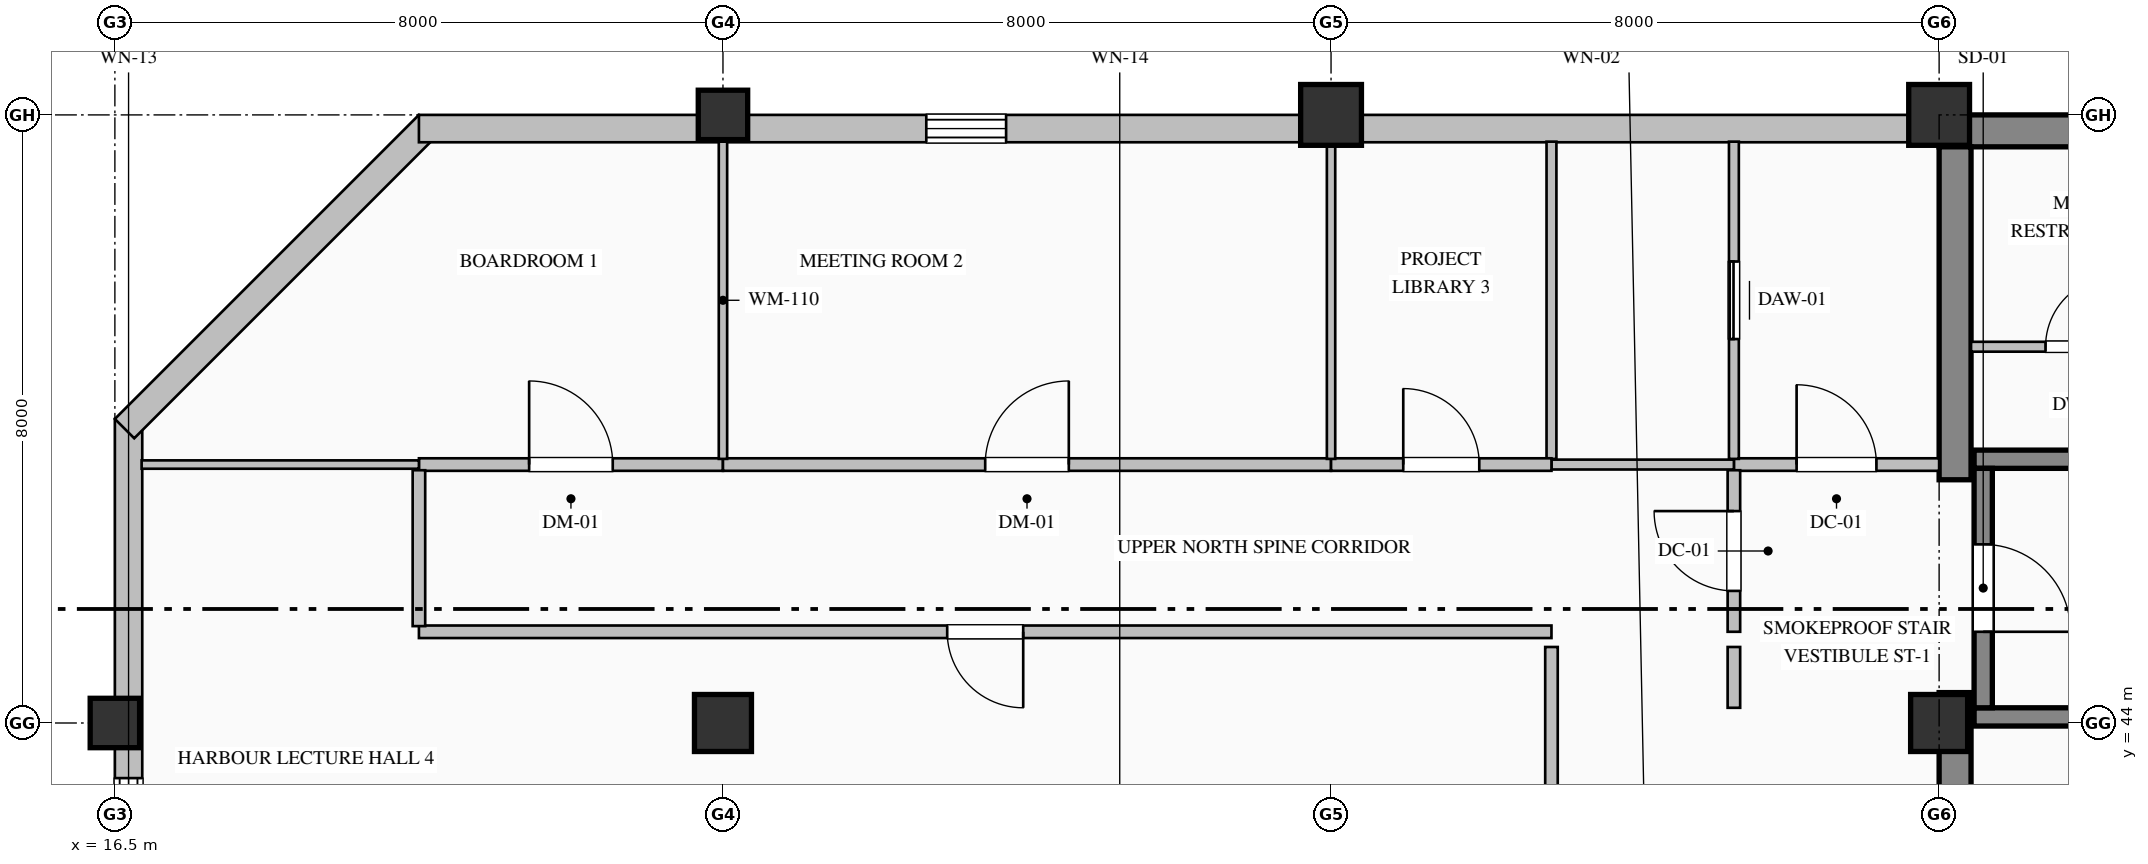
"""IFC4 building model, lengths in metres.
Left out: names, types, materials, properties, quantities, classifications, styles, units other than length and angle.
Written with IfcOpenShell. Run it as: python <this file> out.ifc"""

import sys

from ifc_helpers import new_model, si_unit, direction, frame, frame_2d, origin, origin_2d, place, context, subcontext, project, spatial, rectangle, hollow_rectangle, extrude, element, fill, save


model = new_model("IFC4")
c1 = context("Model", 3, precision=1e-05, world=origin(), true_north=direction((0.0, 1.0)))
c2 = subcontext(c1, "Body", "Model", "MODEL_VIEW")
j1 = project(units=[si_unit("LENGTHUNIT", "METRE"), si_unit("PLANEANGLEUNIT", "RADIAN")], contexts=[c1])
p1 = place(None, origin())
s1 = spatial("IfcSite", under=j1, at=p1, CompositionType="ELEMENT")
p2 = place(p1, origin())
s2 = spatial("IfcBuilding", under=s1, at=p2, CompositionType="ELEMENT")
p3 = place(p2, frame((0.0, 0.0, 303.2)))
s3 = spatial("IfcBuildingStorey", under=s2, at=p3, CompositionType="ELEMENT", Elevation=303.2)
p4 = place(p3, frame((40.5, 51.79, 0.0), z_axis=(0.0, 0.0, 1.0), x_axis=(1.0, 0.0, 0.0)))
e1 = element("IfcWall", 1, at=p4, inside=s3, PredefinedType="SHEAR", context=c2, shape_type="SweptSolid", body=[
    extrude(rectangle(XDim=23.5, YDim=0.42, at=frame_2d((11.75, 0.0))), origin(), (0.0, 0.0, 1.0), 3.785),
])
p5 = place(p3, frame((40.71, 36.42, 0.0), z_axis=(0.0, 0.0, 1.0), x_axis=(0.0, 1.0, 0.0)))
e2 = element("IfcWall", 2, at=p5, inside=s3, PredefinedType="SHEAR", context=c2, shape_type="SweptSolid", body=[
    extrude(rectangle(XDim=7.98, YDim=0.42, at=frame_2d((3.99, 0.0))), origin(), (0.0, 0.0, 1.0), 3.785),
])
p6 = place(p3, frame((40.71, 47.2, 0.0), z_axis=(0.0, 0.0, 1.0), x_axis=(0.0, 1.0, 0.0)))
e3 = element("IfcWall", 3, at=p6, inside=s3, PredefinedType="SHEAR", context=c2, shape_type="SweptSolid", body=[
    extrude(rectangle(XDim=4.38, YDim=0.42, at=frame_2d((2.19, 0.0))), origin(), (0.0, 0.0, 1.0), 3.785),
])
p7 = place(p3, frame((16.5, 44.0, 0.0), z_axis=(0.0, 0.0, 1.0), x_axis=(1.0, 0.0, 0.0)))
e4 = element("IfcColumn", 4, at=p7, inside=s3, PredefinedType="COLUMN", context=c2, shape_type="SweptSolid", body=[
    extrude(hollow_rectangle(XDim=0.65, YDim=0.65, WallThickness=0.028, at=origin_2d()), origin(), (0.0, 0.0, 1.0), 4.0),
])
p8 = place(p3, frame((24.5, 44.0, 0.0), z_axis=(0.0, 0.0, 1.0), x_axis=(1.0, 0.0, 0.0)))
e5 = element("IfcColumn", 5, at=p8, inside=s3, PredefinedType="COLUMN", context=c2, shape_type="SweptSolid", body=[
    extrude(rectangle(XDim=0.75, YDim=0.75, at=origin_2d()), origin(), (0.0, 0.0, 1.0), 4.0),
])
p9 = place(p3, frame((24.5, 52.0, 0.0), z_axis=(0.0, 0.0, 1.0), x_axis=(1.0, 0.0, 0.0)))
e6 = element("IfcColumn", 6, at=p9, inside=s3, PredefinedType="COLUMN", context=c2, shape_type="SweptSolid", body=[
    extrude(hollow_rectangle(XDim=0.65, YDim=0.65, WallThickness=0.028, at=origin_2d()), origin(), (0.0, 0.0, 1.0), 4.0),
])
p10 = place(p3, frame((32.5, 52.0, 0.0), z_axis=(0.0, 0.0, 1.0), x_axis=(1.0, 0.0, 0.0)))
e7 = element("IfcColumn", 7, at=p10, inside=s3, PredefinedType="COLUMN", context=c2, shape_type="SweptSolid", body=[
    extrude(hollow_rectangle(XDim=0.8, YDim=0.8, WallThickness=0.032, at=origin_2d()), origin(), (0.0, 0.0, 1.0), 4.0),
])
p11 = place(p3, frame((40.5, 44.0, 0.0), z_axis=(0.0, 0.0, 1.0), x_axis=(1.0, 0.0, 0.0)))
e8 = element("IfcColumn", 8, at=p11, inside=s3, PredefinedType="COLUMN", context=c2, shape_type="SweptSolid", body=[
    extrude(rectangle(XDim=0.75, YDim=0.75, at=origin_2d()), origin(), (0.0, 0.0, 1.0), 4.0),
])
p12 = place(p3, frame((40.5, 52.0, 0.0), z_axis=(0.0, 0.0, 1.0), x_axis=(1.0, 0.0, 0.0)))
e9 = element("IfcColumn", 9, at=p12, inside=s3, PredefinedType="COLUMN", context=c2, shape_type="SweptSolid", body=[
    extrude(hollow_rectangle(XDim=0.8, YDim=0.8, WallThickness=0.032, at=origin_2d()), origin(), (0.0, 0.0, 1.0), 4.0),
])
p13 = place(p3, frame((16.68, 32.0, 0.0), z_axis=(0.0, 0.0, 1.0), x_axis=(0.0, 1.0, 0.0)))
e10 = element("IfcWall", 10, at=p13, inside=s3, PredefinedType="SOLIDWALL", context=c2, shape_type="SweptSolid", body=[
    extrude(rectangle(XDim=16.0, YDim=0.36, at=frame_2d((8.0, 0.0))), origin(), (0.0, 0.0, 1.0), 3.335),
])
p14 = place(p13, frame((6.525, 0.0, 0.9)))
e11 = element("IfcOpeningElement", 11, at=p14, cuts=e10, PredefinedType="OPENING", context=c2, shape_type="SweptSolid", body=[
    extrude(rectangle(XDim=1.35, YDim=1.85, at=frame_2d((0.675, 0.925))), frame((0.0, 0.19, 0.0), z_axis=(0.0, -1.0, 0.0), x_axis=(1.0, 0.0, 0.0)), (0.0, 0.0, 1.0), 0.38),
])
p15 = place(p13, frame((10.325, 0.0, 0.9)))
e12 = element("IfcOpeningElement", 12, at=p15, cuts=e10, PredefinedType="OPENING", context=c2, shape_type="SweptSolid", body=[
    extrude(rectangle(XDim=0.95, YDim=1.85, at=frame_2d((0.475, 0.925))), frame((0.0, 0.19, 0.0), z_axis=(0.0, -1.0, 0.0), x_axis=(1.0, 0.0, 0.0)), (0.0, 0.0, 1.0), 0.38),
])
p16 = place(p3, frame((16.627, 47.873, 0.0), z_axis=(0.0, 0.0, 1.0), x_axis=(0.707106781187, 0.707106781187, 0.0)))
e13 = element("IfcWall", 13, at=p16, inside=s3, PredefinedType="SOLIDWALL", context=c2, shape_type="SweptSolid", body=[
    extrude(rectangle(XDim=5.657, YDim=0.36, at=frame_2d((2.828, 0.0))), origin(), (0.0, 0.0, 1.0), 3.785),
])
p17 = place(p3, frame((20.5, 51.82, 0.0), z_axis=(0.0, 0.0, 1.0), x_axis=(1.0, 0.0, 0.0)))
e14 = element("IfcWall", 14, at=p17, inside=s3, PredefinedType="SOLIDWALL", context=c2, shape_type="SweptSolid", body=[
    extrude(rectangle(XDim=20.02, YDim=0.36, at=frame_2d((10.01, 0.0))), origin(), (0.0, 0.0, 1.0), 3.335),
])
p18 = place(p17, frame((6.675, 0.0, 0.8)))
e15 = element("IfcOpeningElement", 15, at=p18, cuts=e14, PredefinedType="OPENING", context=c2, shape_type="SweptSolid", body=[
    extrude(rectangle(XDim=1.05, YDim=2.15, at=frame_2d((0.525, 1.075))), frame((0.0, 0.19, 0.0), z_axis=(0.0, -1.0, 0.0), x_axis=(1.0, 0.0, 0.0)), (0.0, 0.0, 1.0), 0.38),
])
for number, where, z_axis, x_axis in (
    (16, (40.96, 47.47, 0.0), (0.0, 0.0, 1.0), (1.0, 0.0, 0.0)),
    (17, (49.04, 44.08, 0.0), (0.0, 0.0, 1.0), (-1.0, 0.0, 0.0)),
):
    element("IfcWall", number, at=place(p3, frame(where, z_axis=z_axis, x_axis=x_axis)), inside=s3, PredefinedType="SOLIDWALL", context=c2, shape_type="SweptSolid", body=[
        extrude(rectangle(XDim=8.08, YDim=0.24, at=frame_2d((4.04, 0.0))), origin(), (0.0, 0.0, 1.0), 4.0),
    ])
p19 = place(p3, frame((41.08, 47.35, 0.0), z_axis=(0.0, 0.0, 1.0), x_axis=(0.0, -1.0, 0.0)))
e18 = element("IfcWall", 18, at=p19, inside=s3, PredefinedType="SOLIDWALL", context=c2, shape_type="SweptSolid", body=[
    extrude(rectangle(XDim=3.15, YDim=0.24, at=frame_2d((1.575, 0.0))), origin(), (0.0, 0.0, 1.0), 4.0),
])
p20 = place(p19, frame((1.0, 0.0, 0.0)))
e19 = element("IfcOpeningElement", 19, at=p20, cuts=e18, PredefinedType="OPENING", context=c2, shape_type="SweptSolid", body=[
    extrude(rectangle(XDim=1.15, YDim=2.2, at=frame_2d((0.575, 1.1))), frame((0.0, 0.13, 0.0), z_axis=(0.0, -1.0, 0.0), x_axis=(1.0, 0.0, 0.0)), (0.0, 0.0, 1.0), 0.26),
])
p21 = place(p3, frame((37.8, 47.4, 0.0), z_axis=(0.0, 0.0, 1.0), x_axis=(1.0, 0.0, 0.0)))
e20 = element("IfcWall", 20, at=p21, inside=s3, PredefinedType="PARTITIONING", context=c2, shape_type="SweptSolid", body=[
    extrude(rectangle(XDim=2.7, YDim=0.165, at=frame_2d((1.35, 0.0))), origin(), (0.0, 0.0, 1.0), 3.785),
])
p22 = place(p21, frame((0.825, 0.0, 0.0)))
e21 = element("IfcOpeningElement", 21, at=p22, cuts=e20, PredefinedType="OPENING", context=c2, shape_type="SweptSolid", body=[
    extrude(rectangle(XDim=1.05, YDim=2.15, at=frame_2d((0.525, 1.075))), frame((0.0, 0.093, 0.0), z_axis=(0.0, -1.0, 0.0), x_axis=(1.0, 0.0, 0.0)), (0.0, 0.0, 1.0), 0.185),
])
p23 = place(p3, frame((37.8, 45.2, 0.0), z_axis=(0.0, 0.0, 1.0), x_axis=(0.0, 1.0, 0.0)))
e22 = element("IfcWall", 22, at=p23, inside=s3, PredefinedType="PARTITIONING", context=c2, shape_type="SweptSolid", body=[
    extrude(rectangle(XDim=2.125, YDim=0.165, at=frame_2d((1.063, 0.0))), origin(), (0.0, 0.0, 1.0), 3.785),
])
p24 = place(p23, frame((0.538, 0.0, 0.0)))
e23 = element("IfcOpeningElement", 23, at=p24, cuts=e22, PredefinedType="OPENING", context=c2, shape_type="SweptSolid", body=[
    extrude(rectangle(XDim=1.05, YDim=2.15, at=frame_2d((0.525, 1.075))), frame((0.0, 0.093, 0.0), z_axis=(0.0, -1.0, 0.0), x_axis=(1.0, 0.0, 0.0)), (0.0, 0.0, 1.0), 0.185),
])
p25 = place(p3, frame((37.8, 44.2, 0.0), z_axis=(0.0, 0.0, 1.0), x_axis=(0.0, 1.0, 0.0)))
e24 = element("IfcWall", 24, at=p25, inside=s3, PredefinedType="PARTITIONING", context=c2, shape_type="SweptSolid", body=[
    extrude(rectangle(XDim=0.8, YDim=0.165, at=frame_2d((0.4, 0.0))), origin(), (0.0, 0.0, 1.0), 3.785),
])
p26 = place(p3, frame((37.8, 47.475, 0.0), z_axis=(0.0, 0.0, 1.0), x_axis=(0.0, 1.0, 0.0)))
e25 = element("IfcWall", 25, at=p26, inside=s3, PredefinedType="PARTITIONING", context=c2, shape_type="SweptSolid", body=[
    extrude(rectangle(XDim=4.173, YDim=0.13, at=frame_2d((2.087, 0.0))), origin(), (0.0, 0.0, 1.0), 3.785),
])
p27 = place(p26, frame((1.577, 0.0, 0.0)))
e26 = element("IfcOpeningElement", 26, at=p27, cuts=e25, PredefinedType="OPENING", context=c2, shape_type="SweptSolid", body=[
    extrude(rectangle(XDim=1.02, YDim=2.15, at=frame_2d((0.51, 1.075))), frame((0.0, 0.075, 0.0), z_axis=(0.0, -1.0, 0.0), x_axis=(1.0, 0.0, 0.0)), (0.0, 0.0, 1.0), 0.15),
])
p28 = place(p3, frame((37.8, 47.4, 0.0), z_axis=(0.0, 0.0, 1.0), x_axis=(-1.0, 0.0, 0.0)))
e27 = element("IfcWall", 27, at=p28, inside=s3, PredefinedType="PARTITIONING", context=c2, shape_type="SweptSolid", body=[
    extrude(rectangle(XDim=2.4, YDim=0.13, at=frame_2d((1.2, 0.0))), origin(), (0.0, 0.0, 1.0), 3.785),
])
p29 = place(p3, frame((35.4, 47.475, 0.0), z_axis=(0.0, 0.0, 1.0), x_axis=(0.0, 1.0, 0.0)))
e28 = element("IfcWall", 28, at=p29, inside=s3, PredefinedType="PARTITIONING", context=c2, shape_type="SweptSolid", body=[
    extrude(rectangle(XDim=4.173, YDim=0.13, at=frame_2d((2.087, 0.0))), origin(), (0.0, 0.0, 1.0), 3.785),
])
p30 = place(p3, frame((40.92, 48.95, 0.0), z_axis=(0.0, 0.0, 1.0), x_axis=(1.0, 0.0, 0.0)))
e29 = element("IfcWall", 29, at=p30, inside=s3, PredefinedType="PARTITIONING", context=c2, shape_type="SweptSolid", body=[
    extrude(rectangle(XDim=2.88, YDim=0.13, at=frame_2d((1.44, 0.0))), origin(), (0.0, 0.0, 1.0), 3.785),
])
p31 = place(p30, frame((0.98, 0.0, 0.0)))
e30 = element("IfcOpeningElement", 30, at=p31, cuts=e29, PredefinedType="OPENING", context=c2, shape_type="SweptSolid", body=[
    extrude(rectangle(XDim=0.92, YDim=2.15, at=frame_2d((0.46, 1.075))), frame((0.0, 0.075, 0.0), z_axis=(0.0, -1.0, 0.0), x_axis=(1.0, 0.0, 0.0)), (0.0, 0.0, 1.0), 0.15),
])
p32 = place(p3, frame((20.5, 47.4, 0.0), z_axis=(0.0, 0.0, 1.0), x_axis=(1.0, 0.0, 0.0)))
e31 = element("IfcWall", 31, at=p32, inside=s3, PredefinedType="PARTITIONING", context=c2, shape_type="SweptSolid", body=[
    extrude(rectangle(XDim=4.0, YDim=0.165, at=frame_2d((2.0, 0.0))), origin(), (0.0, 0.0, 1.0), 3.785),
])
p33 = place(p32, frame((1.45, 0.0, 0.0)))
e32 = element("IfcOpeningElement", 32, at=p33, cuts=e31, PredefinedType="OPENING", context=c2, shape_type="SweptSolid", body=[
    extrude(rectangle(XDim=1.1, YDim=2.2, at=frame_2d((0.55, 1.1))), frame((0.0, 0.093, 0.0), z_axis=(0.0, -1.0, 0.0), x_axis=(1.0, 0.0, 0.0)), (0.0, 0.0, 1.0), 0.185),
])
p34 = place(p3, frame((24.5, 47.4, 0.0), z_axis=(0.0, 0.0, 1.0), x_axis=(1.0, 0.0, 0.0)))
e33 = element("IfcWall", 33, at=p34, inside=s3, PredefinedType="PARTITIONING", context=c2, shape_type="SweptSolid", body=[
    extrude(rectangle(XDim=8.0, YDim=0.165, at=frame_2d((4.0, 0.0))), origin(), (0.0, 0.0, 1.0), 3.785),
])
p35 = place(p34, frame((3.45, 0.0, 0.0)))
e34 = element("IfcOpeningElement", 34, at=p35, cuts=e33, PredefinedType="OPENING", context=c2, shape_type="SweptSolid", body=[
    extrude(rectangle(XDim=1.1, YDim=2.2, at=frame_2d((0.55, 1.1))), frame((0.0, 0.093, 0.0), z_axis=(0.0, -1.0, 0.0), x_axis=(1.0, 0.0, 0.0)), (0.0, 0.0, 1.0), 0.185),
])
p36 = place(p3, frame((32.5, 47.4, 0.0), z_axis=(0.0, 0.0, 1.0), x_axis=(1.0, 0.0, 0.0)))
e35 = element("IfcWall", 35, at=p36, inside=s3, PredefinedType="PARTITIONING", context=c2, shape_type="SweptSolid", body=[
    extrude(rectangle(XDim=2.9, YDim=0.165, at=frame_2d((1.45, 0.0))), origin(), (0.0, 0.0, 1.0), 3.785),
])
p37 = place(p36, frame((0.95, 0.0, 0.0)))
e36 = element("IfcOpeningElement", 36, at=p37, cuts=e35, PredefinedType="OPENING", context=c2, shape_type="SweptSolid", body=[
    extrude(rectangle(XDim=1.0, YDim=2.15, at=frame_2d((0.5, 1.075))), frame((0.0, 0.093, 0.0), z_axis=(0.0, -1.0, 0.0), x_axis=(1.0, 0.0, 0.0)), (0.0, 0.0, 1.0), 0.185),
])
p38 = place(p3, frame((35.4, 45.2, 0.0), z_axis=(0.0, 0.0, 1.0), x_axis=(-1.0, 0.0, 0.0)))
e37 = element("IfcWall", 37, at=p38, inside=s3, PredefinedType="PARTITIONING", context=c2, shape_type="SweptSolid", body=[
    extrude(rectangle(XDim=14.9, YDim=0.165, at=frame_2d((7.45, 0.0))), origin(), (0.0, 0.0, 1.0), 3.785),
])
p39 = place(p38, frame((6.95, 0.0, 0.0)))
e38 = element("IfcOpeningElement", 38, at=p39, cuts=e37, PredefinedType="OPENING", context=c2, shape_type="SweptSolid", body=[
    extrude(rectangle(XDim=1.0, YDim=2.15, at=frame_2d((0.5, 1.075))), frame((0.0, 0.093, 0.0), z_axis=(0.0, -1.0, 0.0), x_axis=(1.0, 0.0, 0.0)), (0.0, 0.0, 1.0), 0.185),
])
p40 = place(p3, frame((20.5, 45.274, 0.0), z_axis=(0.0, 0.0, 1.0), x_axis=(0.0, 1.0, 0.0)))
e39 = element("IfcWall", 39, at=p40, inside=s3, PredefinedType="PARTITIONING", context=c2, shape_type="SweptSolid", body=[
    extrude(rectangle(XDim=2.051, YDim=0.165, at=frame_2d((1.025, 0.0))), origin(), (0.0, 0.0, 1.0), 3.785),
])
p41 = place(p3, frame((35.4, 41.257, 0.0), z_axis=(0.0, 0.0, 1.0), x_axis=(0.0, 1.0, 0.0)))
e40 = element("IfcWall", 40, at=p41, inside=s3, PredefinedType="PARTITIONING", context=c2, shape_type="SweptSolid", body=[
    extrude(rectangle(XDim=3.743, YDim=0.165, at=frame_2d((1.872, 0.0))), origin(), (0.0, 0.0, 1.0), 3.785),
])
p42 = place(p3, frame((24.5, 51.648, 0.0), z_axis=(0.0, 0.0, 1.0), x_axis=(0.0, -1.0, 0.0)))
e41 = element("IfcWall", 41, at=p42, inside=s3, PredefinedType="MOVABLE", context=c2, shape_type="SweptSolid", body=[
    extrude(rectangle(XDim=4.173, YDim=0.11, at=frame_2d((2.087, 0.0))), origin(), (0.0, 0.0, 1.0), 3.177),
])
p43 = place(p3, frame((20.5, 47.4, 0.0), z_axis=(0.0, 0.0, 1.0), x_axis=(-1.0, 0.0, 0.0)))
e42 = element("IfcWall", 42, at=p43, inside=s3, PredefinedType="MOVABLE", context=c2, shape_type="SweptSolid", body=[
    extrude(rectangle(XDim=3.648, YDim=0.11, at=frame_2d((1.824, 0.0))), origin(), (0.0, 0.0, 1.0), 3.785),
])
p44 = place(p3, frame((32.5, 51.648, 0.0), z_axis=(0.0, 0.0, 1.0), x_axis=(0.0, -1.0, 0.0)))
e43 = element("IfcWall", 43, at=p44, inside=s3, PredefinedType="MOVABLE", context=c2, shape_type="SweptSolid", body=[
    extrude(rectangle(XDim=4.173, YDim=0.11, at=frame_2d((2.087, 0.0))), origin(), (0.0, 0.0, 1.0), 3.785),
])
p45 = place(p15, origin())
e44 = element("IfcWindow", 44, at=p45, inside=s3, PartitioningType="SINGLE_PANEL", PredefinedType="WINDOW", context=c2, shape_type="SweptSolid", body=[
    extrude(rectangle(XDim=0.95, YDim=1.85, at=frame_2d((0.475, 0.925))), frame((0.0, 0.15, 0.0), z_axis=(0.0, -1.0, 0.0), x_axis=(1.0, 0.0, 0.0)), (0.0, 0.0, 1.0), 0.06),
])
fill(e12, e44)
p46 = place(p18, origin())
e45 = element("IfcWindow", 45, at=p46, inside=s3, PartitioningType="SINGLE_PANEL", PredefinedType="WINDOW", context=c2, shape_type="SweptSolid", body=[
    extrude(rectangle(XDim=1.05, YDim=2.15, at=frame_2d((0.525, 1.075))), frame((0.0, 0.15, 0.0), z_axis=(0.0, -1.0, 0.0), x_axis=(1.0, 0.0, 0.0)), (0.0, 0.0, 1.0), 0.06),
])
fill(e15, e45)
p47 = place(p20, origin())
e46 = element("IfcDoor", 46, at=p47, inside=s3, OperationType="SINGLE_SWING_RIGHT", PredefinedType="DOOR", context=c2, shape_type="SweptSolid", body=[
    extrude(rectangle(XDim=1.15, YDim=2.2, at=frame_2d((0.575, 1.1))), frame((0.0, 0.025, 0.0), z_axis=(0.0, -1.0, 0.0), x_axis=(1.0, 0.0, 0.0)), (0.0, 0.0, 1.0), 0.05),
])
fill(e19, e46)
p48 = place(p22, origin())
e47 = element("IfcDoor", 47, at=p48, inside=s3, OperationType="SINGLE_SWING_LEFT", PredefinedType="DOOR", context=c2, shape_type="SweptSolid", body=[
    extrude(rectangle(XDim=1.05, YDim=2.15, at=frame_2d((0.525, 1.075))), frame((0.0, 0.025, 0.0), z_axis=(0.0, -1.0, 0.0), x_axis=(1.0, 0.0, 0.0)), (0.0, 0.0, 1.0), 0.05),
])
fill(e21, e47)
p49 = place(p24, origin())
e48 = element("IfcDoor", 48, at=p49, inside=s3, OperationType="SINGLE_SWING_RIGHT", PredefinedType="DOOR", context=c2, shape_type="SweptSolid", body=[
    extrude(rectangle(XDim=1.05, YDim=2.15, at=frame_2d((0.525, 1.075))), frame((0.0, 0.025, 0.0), z_axis=(0.0, -1.0, 0.0), x_axis=(1.0, 0.0, 0.0)), (0.0, 0.0, 1.0), 0.05),
])
fill(e23, e48)
p50 = place(p27, origin())
e49 = element("IfcDoor", 49, at=p50, inside=s3, OperationType="SLIDING_TO_LEFT", PredefinedType="DOOR", context=c2, shape_type="SweptSolid", body=[
    extrude(rectangle(XDim=1.02, YDim=2.15, at=frame_2d((0.51, 1.075))), frame((0.0, 0.025, 0.0), z_axis=(0.0, -1.0, 0.0), x_axis=(1.0, 0.0, 0.0)), (0.0, 0.0, 1.0), 0.05),
])
fill(e26, e49)
p51 = place(p31, origin())
e50 = element("IfcDoor", 50, at=p51, inside=s3, OperationType="SINGLE_SWING_RIGHT", PredefinedType="DOOR", context=c2, shape_type="SweptSolid", body=[
    extrude(rectangle(XDim=0.92, YDim=2.15, at=frame_2d((0.46, 1.075))), frame((0.0, 0.025, 0.0), z_axis=(0.0, -1.0, 0.0), x_axis=(1.0, 0.0, 0.0)), (0.0, 0.0, 1.0), 0.05),
])
fill(e30, e50)
p52 = place(p33, origin())
e51 = element("IfcDoor", 51, at=p52, inside=s3, OperationType="SINGLE_SWING_LEFT", PredefinedType="DOOR", context=c2, shape_type="SweptSolid", body=[
    extrude(rectangle(XDim=1.1, YDim=2.2, at=frame_2d((0.55, 1.1))), frame((0.0, 0.025, 0.0), z_axis=(0.0, -1.0, 0.0), x_axis=(1.0, 0.0, 0.0)), (0.0, 0.0, 1.0), 0.05),
])
fill(e32, e51)
p53 = place(p35, origin())
e52 = element("IfcDoor", 52, at=p53, inside=s3, OperationType="SINGLE_SWING_RIGHT", PredefinedType="DOOR", context=c2, shape_type="SweptSolid", body=[
    extrude(rectangle(XDim=1.1, YDim=2.2, at=frame_2d((0.55, 1.1))), frame((0.0, 0.025, 0.0), z_axis=(0.0, -1.0, 0.0), x_axis=(1.0, 0.0, 0.0)), (0.0, 0.0, 1.0), 0.05),
])
fill(e34, e52)
p54 = place(p37, origin())
e53 = element("IfcDoor", 53, at=p54, inside=s3, OperationType="SINGLE_SWING_LEFT", PredefinedType="DOOR", context=c2, shape_type="SweptSolid", body=[
    extrude(rectangle(XDim=1.0, YDim=2.15, at=frame_2d((0.5, 1.075))), frame((0.0, 0.025, 0.0), z_axis=(0.0, -1.0, 0.0), x_axis=(1.0, 0.0, 0.0)), (0.0, 0.0, 1.0), 0.05),
])
fill(e36, e53)
p55 = place(p39, origin())
e54 = element("IfcDoor", 54, at=p55, inside=s3, OperationType="SINGLE_SWING_LEFT", PredefinedType="DOOR", context=c2, shape_type="SweptSolid", body=[
    extrude(rectangle(XDim=1.0, YDim=2.15, at=frame_2d((0.5, 1.075))), frame((0.0, 0.025, 0.0), z_axis=(0.0, -1.0, 0.0), x_axis=(1.0, 0.0, 0.0)), (0.0, 0.0, 1.0), 0.05),
])
fill(e38, e54)
save(model, sys.argv[1])
